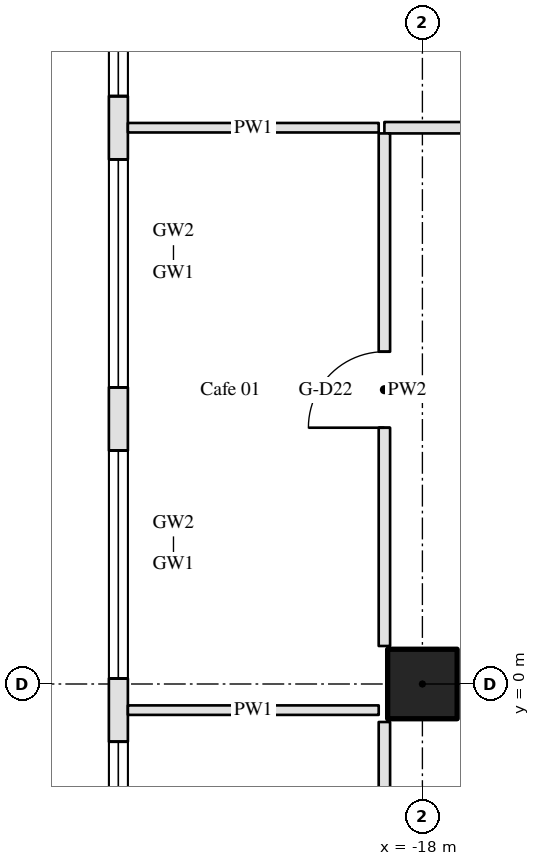
"""IFC4 building model, lengths in metres.
Left out: names, types, materials, properties, quantities, classifications, styles, units other than length and angle.
Written with IfcOpenShell. Run it as: python <this file> out.ifc"""

import sys

from ifc_helpers import new_model, si_unit, direction, frame, frame_2d, origin, origin_2d, place, context, subcontext, project, spatial, rectangle, hollow_circle, extrude, element, fill, save


model = new_model("IFC4")
c1 = context("Model", 3, precision=1e-05, world=origin(), true_north=direction((0.0, 1.0)))
c2 = subcontext(c1, "Body", "Model", "MODEL_VIEW")
j1 = project(units=[si_unit("LENGTHUNIT", "METRE"), si_unit("PLANEANGLEUNIT", "RADIAN")], contexts=[c1])
p1 = place(None, origin())
s1 = spatial("IfcSite", under=j1, at=p1, CompositionType="ELEMENT")
p2 = place(p1, origin())
s2 = spatial("IfcBuilding", under=s1, at=p2, CompositionType="ELEMENT")
p3 = place(p2, origin())
s3 = spatial("IfcBuildingStorey", under=s2, at=p3, CompositionType="ELEMENT", Elevation=0.0)
p4 = place(p3, frame((-18.0, 0.0, 0.0), z_axis=(0.0, 0.0, 1.0), x_axis=(1.0, 0.0, 0.0)))
e1 = element("IfcColumn", 1, at=p4, inside=s3, PredefinedType="COLUMN", context=c2, shape_type="SweptSolid", body=[
    extrude(hollow_circle(Radius=0.457, WallThickness=0.05, at=origin_2d()), origin(), (0.0, 0.0, 1.0), 10.8),
])
p5 = place(p3, frame((-22.0, 11.025, 0.0), z_axis=(0.0, 0.0, 1.0), x_axis=(0.0, -1.0, 0.0)))
e2 = element("IfcWall", 2, at=p5, inside=s3, PredefinedType="STANDARD", context=c2, shape_type="SweptSolid", body=[
    extrude(rectangle(XDim=30.4, YDim=0.25, at=frame_2d((15.2, 0.0))), origin(), (0.0, 0.0, 1.0), 10.0),
])
p6 = place(p5, frame((0.291, 0.0, 0.15)))
e3 = element("IfcOpeningElement", 3, at=p6, cuts=e2, PredefinedType="OPENING", context=c2, shape_type="SweptSolid", body=[
    extrude(rectangle(XDim=3.0, YDim=4.2, at=frame_2d((1.5, 2.1))), frame((0.0, 0.135, 0.0), z_axis=(0.0, -1.0, 0.0), x_axis=(1.0, 0.0, 0.0)), (0.0, 0.0, 1.0), 0.27),
])
p7 = place(p5, frame((0.291, 0.0, 4.95)))
e4 = element("IfcOpeningElement", 4, at=p7, cuts=e2, PredefinedType="OPENING", context=c2, shape_type="SweptSolid", body=[
    extrude(rectangle(XDim=3.0, YDim=4.4, at=frame_2d((1.5, 2.2))), frame((0.0, 0.135, 0.0), z_axis=(0.0, -1.0, 0.0), x_axis=(1.0, 0.0, 0.0)), (0.0, 0.0, 1.0), 0.27),
])
p8 = place(p5, frame((4.122, 0.0, 0.15)))
e5 = element("IfcOpeningElement", 5, at=p8, cuts=e2, PredefinedType="OPENING", context=c2, shape_type="SweptSolid", body=[
    extrude(rectangle(XDim=3.0, YDim=4.2, at=frame_2d((1.5, 2.1))), frame((0.0, 0.135, 0.0), z_axis=(0.0, -1.0, 0.0), x_axis=(1.0, 0.0, 0.0)), (0.0, 0.0, 1.0), 0.27),
])
p9 = place(p5, frame((4.122, 0.0, 4.95)))
e6 = element("IfcOpeningElement", 6, at=p9, cuts=e2, PredefinedType="OPENING", context=c2, shape_type="SweptSolid", body=[
    extrude(rectangle(XDim=3.0, YDim=4.4, at=frame_2d((1.5, 2.2))), frame((0.0, 0.135, 0.0), z_axis=(0.0, -1.0, 0.0), x_axis=(1.0, 0.0, 0.0)), (0.0, 0.0, 1.0), 0.27),
])
p10 = place(p5, frame((7.953, 0.0, 0.15)))
e7 = element("IfcOpeningElement", 7, at=p10, cuts=e2, PredefinedType="OPENING", context=c2, shape_type="SweptSolid", body=[
    extrude(rectangle(XDim=3.0, YDim=4.2, at=frame_2d((1.5, 2.1))), frame((0.0, 0.135, 0.0), z_axis=(0.0, -1.0, 0.0), x_axis=(1.0, 0.0, 0.0)), (0.0, 0.0, 1.0), 0.27),
])
p11 = place(p5, frame((7.953, 0.0, 4.95)))
e8 = element("IfcOpeningElement", 8, at=p11, cuts=e2, PredefinedType="OPENING", context=c2, shape_type="SweptSolid", body=[
    extrude(rectangle(XDim=3.0, YDim=4.4, at=frame_2d((1.5, 2.2))), frame((0.0, 0.135, 0.0), z_axis=(0.0, -1.0, 0.0), x_axis=(1.0, 0.0, 0.0)), (0.0, 0.0, 1.0), 0.27),
])
p12 = place(p5, frame((11.784, 0.0, 0.15)))
e9 = element("IfcOpeningElement", 9, at=p12, cuts=e2, PredefinedType="OPENING", context=c2, shape_type="SweptSolid", body=[
    extrude(rectangle(XDim=3.0, YDim=4.2, at=frame_2d((1.5, 2.1))), frame((0.0, 0.135, 0.0), z_axis=(0.0, -1.0, 0.0), x_axis=(1.0, 0.0, 0.0)), (0.0, 0.0, 1.0), 0.27),
])
p13 = place(p5, frame((11.784, 0.0, 4.95)))
e10 = element("IfcOpeningElement", 10, at=p13, cuts=e2, PredefinedType="OPENING", context=c2, shape_type="SweptSolid", body=[
    extrude(rectangle(XDim=3.0, YDim=4.4, at=frame_2d((1.5, 2.2))), frame((0.0, 0.135, 0.0), z_axis=(0.0, -1.0, 0.0), x_axis=(1.0, 0.0, 0.0)), (0.0, 0.0, 1.0), 0.27),
])
p14 = place(p5, frame((15.916, 0.0, 0.0)))
e11 = element("IfcOpeningElement", 11, at=p14, cuts=e2, PredefinedType="OPENING", context=c2, shape_type="SweptSolid", body=[
    extrude(rectangle(XDim=2.4, YDim=2.6, at=frame_2d((1.2, 1.3))), frame((0.0, 0.135, 0.0), z_axis=(0.0, -1.0, 0.0), x_axis=(1.0, 0.0, 0.0)), (0.0, 0.0, 1.0), 0.27),
])
p15 = place(p5, frame((15.616, 0.0, 2.9)))
e12 = element("IfcOpeningElement", 12, at=p15, cuts=e2, PredefinedType="OPENING", context=c2, shape_type="SweptSolid", body=[
    extrude(rectangle(XDim=3.0, YDim=1.45, at=frame_2d((1.5, 0.725))), frame((0.0, 0.135, 0.0), z_axis=(0.0, -1.0, 0.0), x_axis=(1.0, 0.0, 0.0)), (0.0, 0.0, 1.0), 0.27),
])
p16 = place(p5, frame((15.616, 0.0, 4.95)))
e13 = element("IfcOpeningElement", 13, at=p16, cuts=e2, PredefinedType="OPENING", context=c2, shape_type="SweptSolid", body=[
    extrude(rectangle(XDim=3.0, YDim=4.4, at=frame_2d((1.5, 2.2))), frame((0.0, 0.135, 0.0), z_axis=(0.0, -1.0, 0.0), x_axis=(1.0, 0.0, 0.0)), (0.0, 0.0, 1.0), 0.27),
])
p17 = place(p5, frame((19.447, 0.0, 0.15)))
e14 = element("IfcOpeningElement", 14, at=p17, cuts=e2, PredefinedType="OPENING", context=c2, shape_type="SweptSolid", body=[
    extrude(rectangle(XDim=3.0, YDim=4.2, at=frame_2d((1.5, 2.1))), frame((0.0, 0.135, 0.0), z_axis=(0.0, -1.0, 0.0), x_axis=(1.0, 0.0, 0.0)), (0.0, 0.0, 1.0), 0.27),
])
p18 = place(p5, frame((19.447, 0.0, 4.95)))
e15 = element("IfcOpeningElement", 15, at=p18, cuts=e2, PredefinedType="OPENING", context=c2, shape_type="SweptSolid", body=[
    extrude(rectangle(XDim=3.0, YDim=4.4, at=frame_2d((1.5, 2.2))), frame((0.0, 0.135, 0.0), z_axis=(0.0, -1.0, 0.0), x_axis=(1.0, 0.0, 0.0)), (0.0, 0.0, 1.0), 0.27),
])
p19 = place(p5, frame((23.278, 0.0, 0.15)))
e16 = element("IfcOpeningElement", 16, at=p19, cuts=e2, PredefinedType="OPENING", context=c2, shape_type="SweptSolid", body=[
    extrude(rectangle(XDim=3.0, YDim=4.2, at=frame_2d((1.5, 2.1))), frame((0.0, 0.135, 0.0), z_axis=(0.0, -1.0, 0.0), x_axis=(1.0, 0.0, 0.0)), (0.0, 0.0, 1.0), 0.27),
])
p20 = place(p5, frame((23.278, 0.0, 4.95)))
e17 = element("IfcOpeningElement", 17, at=p20, cuts=e2, PredefinedType="OPENING", context=c2, shape_type="SweptSolid", body=[
    extrude(rectangle(XDim=3.0, YDim=4.4, at=frame_2d((1.5, 2.2))), frame((0.0, 0.135, 0.0), z_axis=(0.0, -1.0, 0.0), x_axis=(1.0, 0.0, 0.0)), (0.0, 0.0, 1.0), 0.27),
])
p21 = place(p5, frame((27.109, 0.0, 0.15)))
e18 = element("IfcOpeningElement", 18, at=p21, cuts=e2, PredefinedType="OPENING", context=c2, shape_type="SweptSolid", body=[
    extrude(rectangle(XDim=3.0, YDim=4.2, at=frame_2d((1.5, 2.1))), frame((0.0, 0.135, 0.0), z_axis=(0.0, -1.0, 0.0), x_axis=(1.0, 0.0, 0.0)), (0.0, 0.0, 1.0), 0.27),
])
p22 = place(p5, frame((27.109, 0.0, 4.95)))
e19 = element("IfcOpeningElement", 19, at=p22, cuts=e2, PredefinedType="OPENING", context=c2, shape_type="SweptSolid", body=[
    extrude(rectangle(XDim=3.0, YDim=4.4, at=frame_2d((1.5, 2.2))), frame((0.0, 0.135, 0.0), z_axis=(0.0, -1.0, 0.0), x_axis=(1.0, 0.0, 0.0)), (0.0, 0.0, 1.0), 0.27),
])
for number, where, z_axis, x_axis in (
    (20, (-21.875, -0.344, 0.0), (0.0, 0.0, 1.0), (1.0, 0.0, 0.0)),
    (21, (-21.875, 7.319, 0.0), (0.0, 0.0, 1.0), (1.0, 0.0, 0.0)),
):
    element("IfcWall", number, at=place(p3, frame(where, z_axis=z_axis, x_axis=x_axis)), inside=s3, PredefinedType="PARTITIONING", context=c2, shape_type="SweptSolid", body=[
        extrude(rectangle(XDim=3.3, YDim=0.125, at=frame_2d((1.65, 0.0))), origin(), (0.0, 0.0, 1.0), 9.86),
    ])
p23 = place(p3, frame((-18.5, 7.319, 0.0), z_axis=(0.0, 0.0, 1.0), x_axis=(1.0, 0.0, 0.0)))
e22 = element("IfcWall", 22, at=p23, inside=s3, PredefinedType="PARTITIONING", context=c2, shape_type="SweptSolid", body=[
    extrude(rectangle(XDim=4.9, YDim=0.15, at=frame_2d((2.45, 0.0))), origin(), (0.0, 0.0, 1.0), 9.86),
])
p24 = place(p23, frame((1.95, 0.0, 0.0)))
e23 = element("IfcOpeningElement", 23, at=p24, cuts=e22, PredefinedType="OPENING", context=c2, shape_type="SweptSolid", body=[
    extrude(rectangle(XDim=1.0, YDim=2.1, at=frame_2d((0.5, 1.05))), frame((0.0, 0.085, 0.0), z_axis=(0.0, -1.0, 0.0), x_axis=(1.0, 0.0, 0.0)), (0.0, 0.0, 1.0), 0.17),
])
p25 = place(p3, frame((-18.5, -4.1, 0.0), z_axis=(0.0, 0.0, 1.0), x_axis=(0.0, 1.0, 0.0)))
e24 = element("IfcWall", 24, at=p25, inside=s3, PredefinedType="PARTITIONING", context=c2, shape_type="SweptSolid", body=[
    extrude(rectangle(XDim=3.6, YDim=0.15, at=frame_2d((1.8, 0.0))), origin(), (0.0, 0.0, 1.0), 9.86),
])
p26 = place(p25, frame((1.3, 0.0, 0.0)))
e25 = element("IfcOpeningElement", 25, at=p26, cuts=e24, PredefinedType="OPENING", context=c2, shape_type="SweptSolid", body=[
    extrude(rectangle(XDim=1.0, YDim=2.1, at=frame_2d((0.5, 1.05))), frame((0.0, 0.085, 0.0), z_axis=(0.0, -1.0, 0.0), x_axis=(1.0, 0.0, 0.0)), (0.0, 0.0, 1.0), 0.17),
])
p27 = place(p3, frame((-18.5, 0.5, 0.0), z_axis=(0.0, 0.0, 1.0), x_axis=(0.0, 1.0, 0.0)))
e26 = element("IfcWall", 26, at=p27, inside=s3, PredefinedType="PARTITIONING", context=c2, shape_type="SweptSolid", body=[
    extrude(rectangle(XDim=6.744, YDim=0.15, at=frame_2d((3.372, 0.0))), origin(), (0.0, 0.0, 1.0), 9.86),
])
p28 = place(p27, frame((2.872, 0.0, 0.0)))
e27 = element("IfcOpeningElement", 27, at=p28, cuts=e26, PredefinedType="OPENING", context=c2, shape_type="SweptSolid", body=[
    extrude(rectangle(XDim=1.0, YDim=2.1, at=frame_2d((0.5, 1.05))), frame((0.0, 0.085, 0.0), z_axis=(0.0, -1.0, 0.0), x_axis=(1.0, 0.0, 0.0)), (0.0, 0.0, 1.0), 0.17),
])
p29 = place(p6, origin())
e28 = element("IfcWindow", 28, at=p29, inside=s3, PartitioningType="DOUBLE_PANEL_HORIZONTAL", PredefinedType="WINDOW", context=c2, shape_type="SweptSolid", body=[
    extrude(rectangle(XDim=3.0, YDim=4.2, at=frame_2d((1.5, 2.1))), frame((0.0, 0.03, 0.0), z_axis=(0.0, -1.0, 0.0), x_axis=(1.0, 0.0, 0.0)), (0.0, 0.0, 1.0), 0.06),
])
fill(e3, e28)
p30 = place(p7, origin())
e29 = element("IfcWindow", 29, at=p30, inside=s3, PartitioningType="DOUBLE_PANEL_HORIZONTAL", PredefinedType="WINDOW", context=c2, shape_type="SweptSolid", body=[
    extrude(rectangle(XDim=3.0, YDim=4.4, at=frame_2d((1.5, 2.2))), frame((0.0, 0.03, 0.0), z_axis=(0.0, -1.0, 0.0), x_axis=(1.0, 0.0, 0.0)), (0.0, 0.0, 1.0), 0.06),
])
fill(e4, e29)
p31 = place(p8, origin())
e30 = element("IfcWindow", 30, at=p31, inside=s3, PartitioningType="DOUBLE_PANEL_HORIZONTAL", PredefinedType="WINDOW", context=c2, shape_type="SweptSolid", body=[
    extrude(rectangle(XDim=3.0, YDim=4.2, at=frame_2d((1.5, 2.1))), frame((0.0, 0.03, 0.0), z_axis=(0.0, -1.0, 0.0), x_axis=(1.0, 0.0, 0.0)), (0.0, 0.0, 1.0), 0.06),
])
fill(e5, e30)
p32 = place(p9, origin())
e31 = element("IfcWindow", 31, at=p32, inside=s3, PartitioningType="DOUBLE_PANEL_HORIZONTAL", PredefinedType="WINDOW", context=c2, shape_type="SweptSolid", body=[
    extrude(rectangle(XDim=3.0, YDim=4.4, at=frame_2d((1.5, 2.2))), frame((0.0, 0.03, 0.0), z_axis=(0.0, -1.0, 0.0), x_axis=(1.0, 0.0, 0.0)), (0.0, 0.0, 1.0), 0.06),
])
fill(e6, e31)
p33 = place(p10, origin())
e32 = element("IfcWindow", 32, at=p33, inside=s3, PartitioningType="DOUBLE_PANEL_HORIZONTAL", PredefinedType="WINDOW", context=c2, shape_type="SweptSolid", body=[
    extrude(rectangle(XDim=3.0, YDim=4.2, at=frame_2d((1.5, 2.1))), frame((0.0, 0.03, 0.0), z_axis=(0.0, -1.0, 0.0), x_axis=(1.0, 0.0, 0.0)), (0.0, 0.0, 1.0), 0.06),
])
fill(e7, e32)
p34 = place(p11, origin())
e33 = element("IfcWindow", 33, at=p34, inside=s3, PartitioningType="DOUBLE_PANEL_HORIZONTAL", PredefinedType="WINDOW", context=c2, shape_type="SweptSolid", body=[
    extrude(rectangle(XDim=3.0, YDim=4.4, at=frame_2d((1.5, 2.2))), frame((0.0, 0.03, 0.0), z_axis=(0.0, -1.0, 0.0), x_axis=(1.0, 0.0, 0.0)), (0.0, 0.0, 1.0), 0.06),
])
fill(e8, e33)
p35 = place(p12, origin())
e34 = element("IfcWindow", 34, at=p35, inside=s3, PartitioningType="DOUBLE_PANEL_HORIZONTAL", PredefinedType="WINDOW", context=c2, shape_type="SweptSolid", body=[
    extrude(rectangle(XDim=3.0, YDim=4.2, at=frame_2d((1.5, 2.1))), frame((0.0, 0.03, 0.0), z_axis=(0.0, -1.0, 0.0), x_axis=(1.0, 0.0, 0.0)), (0.0, 0.0, 1.0), 0.06),
])
fill(e9, e34)
p36 = place(p13, origin())
e35 = element("IfcWindow", 35, at=p36, inside=s3, PartitioningType="DOUBLE_PANEL_HORIZONTAL", PredefinedType="WINDOW", context=c2, shape_type="SweptSolid", body=[
    extrude(rectangle(XDim=3.0, YDim=4.4, at=frame_2d((1.5, 2.2))), frame((0.0, 0.03, 0.0), z_axis=(0.0, -1.0, 0.0), x_axis=(1.0, 0.0, 0.0)), (0.0, 0.0, 1.0), 0.06),
])
fill(e10, e35)
p37 = place(p28, origin())
e36 = element("IfcDoor", 36, at=p37, inside=s3, OperationType="SINGLE_SWING_LEFT", PredefinedType="DOOR", context=c2, shape_type="SweptSolid", body=[
    extrude(rectangle(XDim=1.0, YDim=2.1, at=frame_2d((0.5, 1.05))), frame((0.0, 0.025, 0.0), z_axis=(0.0, -1.0, 0.0), x_axis=(1.0, 0.0, 0.0)), (0.0, 0.0, 1.0), 0.05),
])
fill(e27, e36)
save(model, sys.argv[1])
